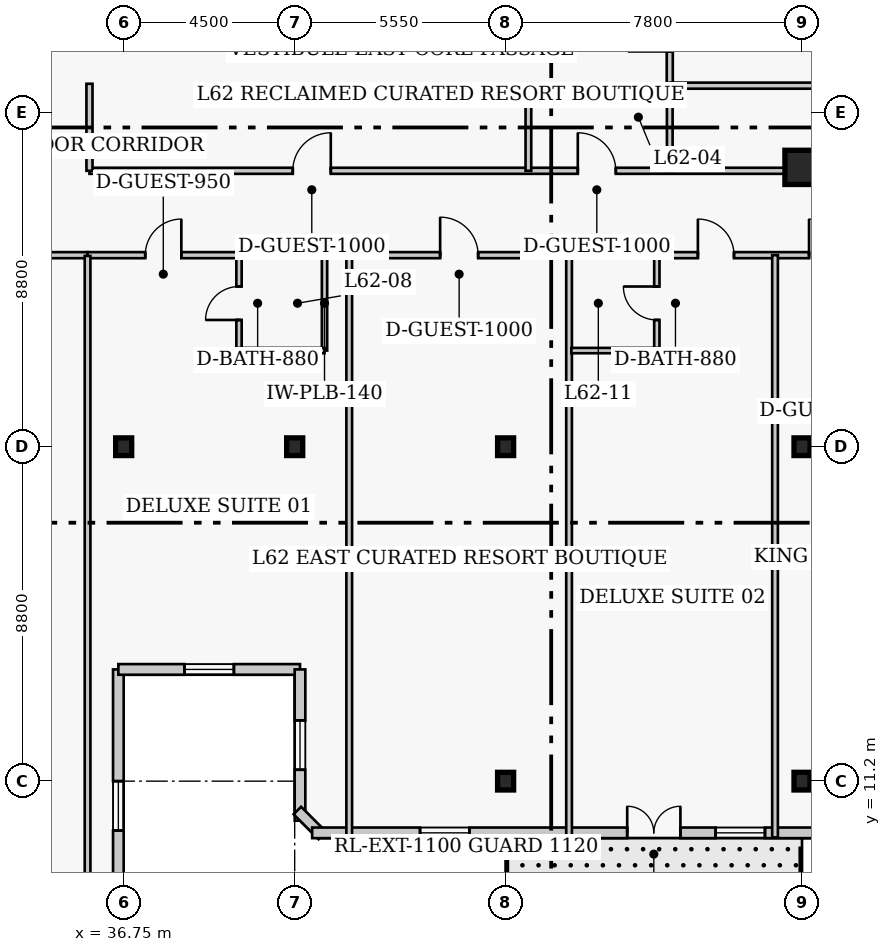
"""IFC4 building model, lengths in metres.
Left out: names, types, materials, properties, quantities, classifications, styles, units other than length and angle.
Written with IfcOpenShell. Run it as: python <this file> out.ifc"""

import sys

from ifc_helpers import new_model, si_unit, direction, frame, frame_2d, origin, origin_2d, place, context, subcontext, project, spatial, rectangle, i_section, extrude, element, fill, save


model = new_model("IFC4")
c1 = context("Model", 3, precision=1e-05, world=origin(), true_north=direction((0.0, 1.0)))
c2 = subcontext(c1, "Body", "Model", "MODEL_VIEW")
j1 = project(units=[si_unit("LENGTHUNIT", "METRE"), si_unit("PLANEANGLEUNIT", "RADIAN")], contexts=[c1])
p1 = place(None, origin())
s1 = spatial("IfcSite", under=j1, at=p1, CompositionType="ELEMENT")
p2 = place(p1, origin())
s2 = spatial("IfcBuilding", under=s1, at=p2, CompositionType="ELEMENT")
p3 = place(p2, frame((0.0, 0.0, 249.4)))
s3 = spatial("IfcBuildingStorey", under=s2, at=p3, CompositionType="ELEMENT", Elevation=249.4)
for number, where, z_axis, x_axis in (
    (1, (36.75, 20.0, 0.0), (0.0, 0.0, 1.0), (1.0, 0.0, 0.0)),
    (2, (41.25, 20.0, 0.0), (0.0, 0.0, 1.0), (1.0, 0.0, 0.0)),
    (3, (46.8, 11.2, 0.0), (0.0, 0.0, 1.0), (1.0, 0.0, 0.0)),
    (4, (46.8, 20.0, 0.0), (0.0, 0.0, 1.0), (1.0, 0.0, 0.0)),
    (5, (54.6, 11.2, 0.0), (0.0, 0.0, 1.0), (1.0, 0.0, 0.0)),
    (6, (54.6, 20.0, 0.0), (0.0, 0.0, 1.0), (1.0, 0.0, 0.0)),
):
    element("IfcColumn", number, at=place(p3, frame(where, z_axis=z_axis, x_axis=x_axis)), inside=s3, PredefinedType="COLUMN", context=c2, shape_type="SweptSolid", body=[
        extrude(i_section(OverallWidth=0.422, OverallDepth=0.465, WebThickness=0.045, FlangeThickness=0.073, FilletRadius=0.017, at=origin_2d()), origin(), (0.0, 0.0, 1.0), 4.0),
    ])
p4 = place(p3, frame((54.6, 27.35, 0.0), z_axis=(0.0, 0.0, 1.0), x_axis=(1.0, 0.0, 0.0)))
e7 = element("IfcColumn", 7, at=p4, inside=s3, PredefinedType="COLUMN", context=c2, shape_type="SweptSolid", body=[
    extrude(rectangle(XDim=0.9, YDim=0.9, at=origin_2d()), origin(), (0.0, 0.0, 1.0), 4.0),
])
p5 = place(p3, frame((36.61, 6.96, 0.0), z_axis=(0.0, 0.0, 1.0), x_axis=(0.0, 1.0, 0.0)))
e8 = element("IfcWall", 8, at=p5, inside=s3, PredefinedType="SOLIDWALL", context=c2, shape_type="SweptSolid", body=[
    extrude(rectangle(XDim=7.18, YDim=0.28, at=frame_2d((3.59, 0.0))), origin(), (0.0, 0.0, 1.0), 3.76),
])
p6 = place(p5, frame((2.94, 0.0, 0.85)))
e9 = element("IfcOpeningElement", 9, at=p6, cuts=e8, PredefinedType="OPENING", context=c2, shape_type="SweptSolid", body=[
    extrude(rectangle(XDim=1.3, YDim=1.7, at=frame_2d((0.65, 0.85))), frame((0.0, 0.15, 0.0), z_axis=(0.0, -1.0, 0.0), x_axis=(1.0, 0.0, 0.0)), (0.0, 0.0, 1.0), 0.3),
])
p7 = place(p3, frame((36.61, 14.14, 0.0), z_axis=(0.0, 0.0, 1.0), x_axis=(1.0, 0.0, 0.0)))
e10 = element("IfcWall", 10, at=p7, inside=s3, PredefinedType="SOLIDWALL", context=c2, shape_type="SweptSolid", body=[
    extrude(rectangle(XDim=4.78, YDim=0.28, at=frame_2d((2.39, 0.0))), origin(), (0.0, 0.0, 1.0), 3.76),
])
p8 = place(p7, frame((1.74, 0.0, 0.85)))
e11 = element("IfcOpeningElement", 11, at=p8, cuts=e10, PredefinedType="OPENING", context=c2, shape_type="SweptSolid", body=[
    extrude(rectangle(XDim=1.3, YDim=1.7, at=frame_2d((0.65, 0.85))), frame((0.0, 0.15, 0.0), z_axis=(0.0, -1.0, 0.0), x_axis=(1.0, 0.0, 0.0)), (0.0, 0.0, 1.0), 0.3),
])
p9 = place(p3, frame((41.39, 14.14, 0.0), z_axis=(0.0, 0.0, 1.0), x_axis=(0.0, -1.0, 0.0)))
e12 = element("IfcWall", 12, at=p9, inside=s3, PredefinedType="SOLIDWALL", context=c2, shape_type="SweptSolid", body=[
    extrude(rectangle(XDim=3.98, YDim=0.28, at=frame_2d((1.99, 0.0))), origin(), (0.0, 0.0, 1.0), 3.76),
])
p10 = place(p9, frame((1.34, 0.0, 0.85)))
e13 = element("IfcOpeningElement", 13, at=p10, cuts=e12, PredefinedType="OPENING", context=c2, shape_type="SweptSolid", body=[
    extrude(rectangle(XDim=1.3, YDim=1.7, at=frame_2d((0.65, 0.85))), frame((0.0, 0.15, 0.0), z_axis=(0.0, -1.0, 0.0), x_axis=(1.0, 0.0, 0.0)), (0.0, 0.0, 1.0), 0.3),
])
p11 = place(p3, frame((41.321, 10.427, 0.0), z_axis=(0.0, 0.0, 1.0), x_axis=(0.707106781187, -0.707106781187, 0.0)))
e14 = element("IfcWall", 14, at=p11, inside=s3, PredefinedType="SOLIDWALL", context=c2, shape_type="SweptSolid", body=[
    extrude(rectangle(XDim=0.928, YDim=0.28, at=frame_2d((0.464, 0.0))), origin(), (0.0, 0.0, 1.0), 3.76),
])
p12 = place(p3, frame((41.71, 9.84, 0.0), z_axis=(0.0, 0.0, 1.0), x_axis=(1.0, 0.0, 0.0)))
e15 = element("IfcWall", 15, at=p12, inside=s3, PredefinedType="SOLIDWALL", context=c2, shape_type="SweptSolid", body=[
    extrude(rectangle(XDim=24.83, YDim=0.28, at=frame_2d((12.415, 0.0))), origin(), (0.0, 0.0, 1.0), 3.76),
])
p13 = place(p12, frame((8.29, 0.0, 0.0)))
e16 = element("IfcOpeningElement", 16, at=p13, cuts=e15, PredefinedType="OPENING", context=c2, shape_type="SweptSolid", body=[
    extrude(rectangle(XDim=1.4, YDim=2.15, at=frame_2d((0.7, 1.075))), frame((0.0, 0.15, 0.0), z_axis=(0.0, -1.0, 0.0), x_axis=(1.0, 0.0, 0.0)), (0.0, 0.0, 1.0), 0.3),
])
p14 = place(p12, frame((2.838, 0.0, 0.85)))
e17 = element("IfcOpeningElement", 17, at=p14, cuts=e15, PredefinedType="OPENING", context=c2, shape_type="SweptSolid", body=[
    extrude(rectangle(XDim=1.3, YDim=1.7, at=frame_2d((0.65, 0.85))), frame((0.0, 0.15, 0.0), z_axis=(0.0, -1.0, 0.0), x_axis=(1.0, 0.0, 0.0)), (0.0, 0.0, 1.0), 0.3),
])
p15 = place(p12, frame((10.615, 0.0, 0.85)))
e18 = element("IfcOpeningElement", 18, at=p15, cuts=e15, PredefinedType="OPENING", context=c2, shape_type="SweptSolid", body=[
    extrude(rectangle(XDim=1.3, YDim=1.7, at=frame_2d((0.65, 0.85))), frame((0.0, 0.15, 0.0), z_axis=(0.0, -1.0, 0.0), x_axis=(1.0, 0.0, 0.0)), (0.0, 0.0, 1.0), 0.3),
])
p16 = place(p12, frame((18.892, 0.0, 0.85)))
e19 = element("IfcOpeningElement", 19, at=p16, cuts=e15, PredefinedType="OPENING", context=c2, shape_type="SweptSolid", body=[
    extrude(rectangle(XDim=1.3, YDim=1.7, at=frame_2d((0.65, 0.85))), frame((0.0, 0.15, 0.0), z_axis=(0.0, -1.0, 0.0), x_axis=(1.0, 0.0, 0.0)), (0.0, 0.0, 1.0), 0.3),
])
p17 = place(p12, frame((14.065, 0.0, 0.85)))
e20 = element("IfcOpeningElement", 20, at=p17, cuts=e15, PredefinedType="OPENING", context=c2, shape_type="SweptSolid", body=[
    extrude(rectangle(XDim=1.3, YDim=1.7, at=frame_2d((0.65, 0.85))), frame((0.0, 0.15, 0.0), z_axis=(0.0, -1.0, 0.0), x_axis=(1.0, 0.0, 0.0)), (0.0, 0.0, 1.0), 0.3),
])
p18 = place(p3, frame((51.12, 29.5, 0.0), z_axis=(0.0, 0.0, 1.0), x_axis=(0.0, 1.0, 0.0)))
e21 = element("IfcWall", 21, at=p18, inside=s3, PredefinedType="PARTITIONING", context=c2, shape_type="SweptSolid", body=[
    extrude(rectangle(XDim=3.7, YDim=0.16, at=frame_2d((1.85, 0.0))), origin(), (0.0, 0.0, 1.0), 3.76),
])
p19 = place(p18, frame((0.9, 0.0, 0.0)))
e22 = element("IfcOpeningElement", 22, at=p19, cuts=e21, PredefinedType="OPENING", context=c2, shape_type="SweptSolid", body=[
    extrude(rectangle(XDim=1.1, YDim=2.15, at=frame_2d((0.55, 1.075))), frame((0.0, 0.09, 0.0), z_axis=(0.0, -1.0, 0.0), x_axis=(1.0, 0.0, 0.0)), (0.0, 0.0, 1.0), 0.18),
])
p20 = place(p3, frame((51.12, 29.5, 0.0), z_axis=(0.0, 0.0, 1.0), x_axis=(1.0, 0.0, 0.0)))
e23 = element("IfcWall", 23, at=p20, inside=s3, PredefinedType="PARTITIONING", context=c2, shape_type="SweptSolid", body=[
    extrude(rectangle(XDim=5.63, YDim=0.16, at=frame_2d((2.815, 0.0))), origin(), (0.0, 0.0, 1.0), 3.76),
])
p21 = place(p3, frame((35.85, 27.26, 0.0), z_axis=(0.0, 0.0, 1.0), x_axis=(1.0, 0.0, 0.0)))
e24 = element("IfcWall", 24, at=p21, inside=s3, PredefinedType="PARTITIONING", context=c2, shape_type="SweptSolid", body=[
    extrude(rectangle(XDim=23.15, YDim=0.16, at=frame_2d((11.575, 0.0))), origin(), (0.0, 0.0, 1.0), 3.76),
])
p22 = place(p21, frame((5.35, 0.0, 0.0)))
e25 = element("IfcOpeningElement", 25, at=p22, cuts=e24, PredefinedType="OPENING", context=c2, shape_type="SweptSolid", body=[
    extrude(rectangle(XDim=1.0, YDim=2.15, at=frame_2d((0.5, 1.075))), frame((0.0, 0.09, 0.0), z_axis=(0.0, -1.0, 0.0), x_axis=(1.0, 0.0, 0.0)), (0.0, 0.0, 1.0), 0.18),
])
p23 = place(p21, frame((12.85, 0.0, 0.0)))
e26 = element("IfcOpeningElement", 26, at=p23, cuts=e24, PredefinedType="OPENING", context=c2, shape_type="SweptSolid", body=[
    extrude(rectangle(XDim=1.0, YDim=2.15, at=frame_2d((0.5, 1.075))), frame((0.0, 0.09, 0.0), z_axis=(0.0, -1.0, 0.0), x_axis=(1.0, 0.0, 0.0)), (0.0, 0.0, 1.0), 0.18),
])
p24 = place(p3, frame((35.85, 27.26, 0.0), z_axis=(0.0, 0.0, 1.0), x_axis=(0.0, 1.0, 0.0)))
e27 = element("IfcWall", 27, at=p24, inside=s3, PredefinedType="PARTITIONING", context=c2, shape_type="SweptSolid", body=[
    extrude(rectangle(XDim=2.29, YDim=0.16, at=frame_2d((1.145, 0.0))), origin(), (0.0, 0.0, 1.0), 3.76),
])
p25 = place(p3, frame((19.35, 25.04, 0.0), z_axis=(0.0, 0.0, 1.0), x_axis=(1.0, 0.0, 0.0)))
e28 = element("IfcWall", 28, at=p25, inside=s3, PredefinedType="PARTITIONING", context=c2, shape_type="SweptSolid", body=[
    extrude(rectangle(XDim=16.45, YDim=0.16, at=frame_2d((8.225, 0.0))), origin(), (0.0, 0.0, 1.0), 3.76),
])
p26 = place(p25, frame((7.755, 0.0, 0.0)))
e29 = element("IfcOpeningElement", 29, at=p26, cuts=e28, PredefinedType="OPENING", context=c2, shape_type="SweptSolid", body=[
    extrude(rectangle(XDim=1.0, YDim=2.15, at=frame_2d((0.5, 1.075))), frame((0.0, 0.09, 0.0), z_axis=(0.0, -1.0, 0.0), x_axis=(1.0, 0.0, 0.0)), (0.0, 0.0, 1.0), 0.18),
])
p27 = place(p3, frame((35.8, 25.04, 0.0), z_axis=(0.0, 0.0, 1.0), x_axis=(1.0, 0.0, 0.0)))
e30 = element("IfcWall", 30, at=p27, inside=s3, PredefinedType="PARTITIONING", context=c2, shape_type="SweptSolid", body=[
    extrude(rectangle(XDim=25.36, YDim=0.16, at=frame_2d((12.68, 0.0))), origin(), (0.0, 0.0, 1.0), 3.76),
])
p28 = place(p27, frame((1.518, 0.0, 0.0)))
e31 = element("IfcOpeningElement", 31, at=p28, cuts=e30, PredefinedType="OPENING", context=c2, shape_type="SweptSolid", body=[
    extrude(rectangle(XDim=0.95, YDim=2.1, at=frame_2d((0.475, 1.05))), frame((0.0, 0.09, 0.0), z_axis=(0.0, -1.0, 0.0), x_axis=(1.0, 0.0, 0.0)), (0.0, 0.0, 1.0), 0.18),
])
p29 = place(p27, frame((9.278, 0.0, 0.0)))
e32 = element("IfcOpeningElement", 32, at=p29, cuts=e30, PredefinedType="OPENING", context=c2, shape_type="SweptSolid", body=[
    extrude(rectangle(XDim=1.0, YDim=2.15, at=frame_2d((0.5, 1.075))), frame((0.0, 0.09, 0.0), z_axis=(0.0, -1.0, 0.0), x_axis=(1.0, 0.0, 0.0)), (0.0, 0.0, 1.0), 0.18),
])
p30 = place(p27, frame((16.06, 0.0, 0.0)))
e33 = element("IfcOpeningElement", 33, at=p30, cuts=e30, PredefinedType="OPENING", context=c2, shape_type="SweptSolid", body=[
    extrude(rectangle(XDim=0.95, YDim=2.1, at=frame_2d((0.475, 1.05))), frame((0.0, 0.09, 0.0), z_axis=(0.0, -1.0, 0.0), x_axis=(1.0, 0.0, 0.0)), (0.0, 0.0, 1.0), 0.18),
])
p31 = place(p27, frame((18.985, 0.0, 0.0)))
e34 = element("IfcOpeningElement", 34, at=p31, cuts=e30, PredefinedType="OPENING", context=c2, shape_type="SweptSolid", body=[
    extrude(rectangle(XDim=0.95, YDim=2.1, at=frame_2d((0.475, 1.05))), frame((0.0, 0.09, 0.0), z_axis=(0.0, -1.0, 0.0), x_axis=(1.0, 0.0, 0.0)), (0.0, 0.0, 1.0), 0.18),
])
p32 = place(p27, frame((23.815, 0.0, 0.0)))
e35 = element("IfcOpeningElement", 35, at=p32, cuts=e30, PredefinedType="OPENING", context=c2, shape_type="SweptSolid", body=[
    extrude(rectangle(XDim=0.95, YDim=2.1, at=frame_2d((0.475, 1.05))), frame((0.0, 0.09, 0.0), z_axis=(0.0, -1.0, 0.0), x_axis=(1.0, 0.0, 0.0)), (0.0, 0.0, 1.0), 0.18),
])
for number, where, z_axis, x_axis in (
    (36, (47.4, 27.26, 0.0), (0.0, 0.0, 1.0), (0.0, 1.0, 0.0)),
    (37, (51.12, 27.26, 0.0), (0.0, 0.0, 1.0), (0.0, 1.0, 0.0)),
):
    element("IfcWall", number, at=place(p3, frame(where, z_axis=z_axis, x_axis=x_axis)), inside=s3, PredefinedType="PARTITIONING", context=c2, shape_type="SweptSolid", body=[
        extrude(rectangle(XDim=2.29, YDim=0.15, at=frame_2d((1.145, 0.0))), origin(), (0.0, 0.0, 1.0), 3.76),
    ])
p33 = place(p3, frame((35.8, 6.52, 0.0), z_axis=(0.0, 0.0, 1.0), x_axis=(0.0, 1.0, 0.0)))
e38 = element("IfcWall", 38, at=p33, inside=s3, PredefinedType="PARTITIONING", context=c2, shape_type="SweptSolid", body=[
    extrude(rectangle(XDim=18.5, YDim=0.15, at=frame_2d((9.25, 0.0))), origin(), (0.0, 0.0, 1.0), 3.76),
])
p34 = place(p3, frame((39.785, 22.53, 0.0), z_axis=(0.0, 0.0, 1.0), x_axis=(0.0, 1.0, 0.0)))
e39 = element("IfcWall", 39, at=p34, inside=s3, PredefinedType="PLUMBINGWALL", context=c2, shape_type="SweptSolid", body=[
    extrude(rectangle(XDim=2.49, YDim=0.14, at=frame_2d((1.245, 0.0))), origin(), (0.0, 0.0, 1.0), 3.76),
])
p35 = place(p34, frame((0.805, 0.0, 0.0)))
e40 = element("IfcOpeningElement", 40, at=p35, cuts=e39, PredefinedType="OPENING", context=c2, shape_type="SweptSolid", body=[
    extrude(rectangle(XDim=0.88, YDim=2.05, at=frame_2d((0.44, 1.025))), frame((0.0, 0.08, 0.0), z_axis=(0.0, -1.0, 0.0), x_axis=(1.0, 0.0, 0.0)), (0.0, 0.0, 1.0), 0.16),
])
p36 = place(p3, frame((42.035, 22.53, 0.0), z_axis=(0.0, 0.0, 1.0), x_axis=(0.0, 1.0, 0.0)))
e41 = element("IfcWall", 41, at=p36, inside=s3, PredefinedType="PLUMBINGWALL", context=c2, shape_type="SweptSolid", body=[
    extrude(rectangle(XDim=2.49, YDim=0.14, at=frame_2d((1.245, 0.0))), origin(), (0.0, 0.0, 1.0), 3.76),
])
p37 = place(p3, frame((39.785, 22.53, 0.0), z_axis=(0.0, 0.0, 1.0), x_axis=(1.0, 0.0, 0.0)))
e42 = element("IfcWall", 42, at=p37, inside=s3, PredefinedType="PLUMBINGWALL", context=c2, shape_type="SweptSolid", body=[
    extrude(rectangle(XDim=2.25, YDim=0.14, at=frame_2d((1.125, 0.0))), origin(), (0.0, 0.0, 1.0), 3.76),
])
for number, where, z_axis, x_axis in (
    (43, (42.685, 9.72, 0.0), (0.0, 0.0, 1.0), (0.0, 1.0, 0.0)),
    (44, (48.47, 9.72, 0.0), (0.0, 0.0, 1.0), (0.0, 1.0, 0.0)),
):
    element("IfcWall", number, at=place(p3, frame(where, z_axis=z_axis, x_axis=x_axis)), inside=s3, PredefinedType="PARTITIONING", context=c2, shape_type="SweptSolid", body=[
        extrude(rectangle(XDim=15.32, YDim=0.15, at=frame_2d((7.66, 0.0))), origin(), (0.0, 0.0, 1.0), 3.76),
    ])
p38 = place(p3, frame((50.78, 22.53, 0.0), z_axis=(0.0, 0.0, 1.0), x_axis=(0.0, 1.0, 0.0)))
e45 = element("IfcWall", 45, at=p38, inside=s3, PredefinedType="PLUMBINGWALL", context=c2, shape_type="SweptSolid", body=[
    extrude(rectangle(XDim=2.49, YDim=0.14, at=frame_2d((1.245, 0.0))), origin(), (0.0, 0.0, 1.0), 3.76),
])
p39 = place(p38, frame((0.805, 0.0, 0.0)))
e46 = element("IfcOpeningElement", 46, at=p39, cuts=e45, PredefinedType="OPENING", context=c2, shape_type="SweptSolid", body=[
    extrude(rectangle(XDim=0.88, YDim=2.05, at=frame_2d((0.44, 1.025))), frame((0.0, 0.08, 0.0), z_axis=(0.0, -1.0, 0.0), x_axis=(1.0, 0.0, 0.0)), (0.0, 0.0, 1.0), 0.16),
])
p40 = place(p3, frame((48.53, 22.53, 0.0), z_axis=(0.0, 0.0, 1.0), x_axis=(1.0, 0.0, 0.0)))
e47 = element("IfcWall", 47, at=p40, inside=s3, PredefinedType="PLUMBINGWALL", context=c2, shape_type="SweptSolid", body=[
    extrude(rectangle(XDim=2.25, YDim=0.14, at=frame_2d((1.125, 0.0))), origin(), (0.0, 0.0, 1.0), 3.76),
])
p41 = place(p3, frame((53.89, 9.72, 0.0), z_axis=(0.0, 0.0, 1.0), x_axis=(0.0, 1.0, 0.0)))
e48 = element("IfcWall", 48, at=p41, inside=s3, PredefinedType="PARTITIONING", context=c2, shape_type="SweptSolid", body=[
    extrude(rectangle(XDim=15.32, YDim=0.15, at=frame_2d((7.66, 0.0))), origin(), (0.0, 0.0, 1.0), 3.76),
])
p42 = place(p6, origin())
e49 = element("IfcWindow", 49, at=p42, inside=s3, PartitioningType="SINGLE_PANEL", PredefinedType="WINDOW", context=c2, shape_type="SweptSolid", body=[
    extrude(rectangle(XDim=1.3, YDim=1.7, at=frame_2d((0.65, 0.85))), frame((0.0, 0.03, 0.0), z_axis=(0.0, -1.0, 0.0), x_axis=(1.0, 0.0, 0.0)), (0.0, 0.0, 1.0), 0.06),
])
fill(e9, e49)
p43 = place(p8, origin())
e50 = element("IfcWindow", 50, at=p43, inside=s3, PartitioningType="SINGLE_PANEL", PredefinedType="WINDOW", context=c2, shape_type="SweptSolid", body=[
    extrude(rectangle(XDim=1.3, YDim=1.7, at=frame_2d((0.65, 0.85))), frame((0.0, 0.03, 0.0), z_axis=(0.0, -1.0, 0.0), x_axis=(1.0, 0.0, 0.0)), (0.0, 0.0, 1.0), 0.06),
])
fill(e11, e50)
p44 = place(p10, origin())
e51 = element("IfcWindow", 51, at=p44, inside=s3, PartitioningType="SINGLE_PANEL", PredefinedType="WINDOW", context=c2, shape_type="SweptSolid", body=[
    extrude(rectangle(XDim=1.3, YDim=1.7, at=frame_2d((0.65, 0.85))), frame((0.0, 0.03, 0.0), z_axis=(0.0, -1.0, 0.0), x_axis=(1.0, 0.0, 0.0)), (0.0, 0.0, 1.0), 0.06),
])
fill(e13, e51)
p45 = place(p13, origin())
e52 = element("IfcDoor", 52, at=p45, inside=s3, OperationType="DOUBLE_DOOR_SINGLE_SWING", PredefinedType="DOOR", context=c2, shape_type="SweptSolid", body=[
    extrude(rectangle(XDim=1.4, YDim=2.15, at=frame_2d((0.7, 1.075))), frame((0.0, 0.025, 0.0), z_axis=(0.0, -1.0, 0.0), x_axis=(1.0, 0.0, 0.0)), (0.0, 0.0, 1.0), 0.05),
])
fill(e16, e52)
p46 = place(p14, origin())
e53 = element("IfcWindow", 53, at=p46, inside=s3, PartitioningType="SINGLE_PANEL", PredefinedType="WINDOW", context=c2, shape_type="SweptSolid", body=[
    extrude(rectangle(XDim=1.3, YDim=1.7, at=frame_2d((0.65, 0.85))), frame((0.0, 0.03, 0.0), z_axis=(0.0, -1.0, 0.0), x_axis=(1.0, 0.0, 0.0)), (0.0, 0.0, 1.0), 0.06),
])
fill(e17, e53)
p47 = place(p15, origin())
e54 = element("IfcWindow", 54, at=p47, inside=s3, PartitioningType="SINGLE_PANEL", PredefinedType="WINDOW", context=c2, shape_type="SweptSolid", body=[
    extrude(rectangle(XDim=1.3, YDim=1.7, at=frame_2d((0.65, 0.85))), frame((0.0, 0.03, 0.0), z_axis=(0.0, -1.0, 0.0), x_axis=(1.0, 0.0, 0.0)), (0.0, 0.0, 1.0), 0.06),
])
fill(e18, e54)
p48 = place(p22, origin())
e55 = element("IfcDoor", 55, at=p48, inside=s3, OperationType="SINGLE_SWING_RIGHT", PredefinedType="DOOR", context=c2, shape_type="SweptSolid", body=[
    extrude(rectangle(XDim=1.0, YDim=2.15, at=frame_2d((0.5, 1.075))), frame((0.0, 0.025, 0.0), z_axis=(0.0, -1.0, 0.0), x_axis=(1.0, 0.0, 0.0)), (0.0, 0.0, 1.0), 0.05),
])
fill(e25, e55)
p49 = place(p23, origin())
e56 = element("IfcDoor", 56, at=p49, inside=s3, OperationType="SINGLE_SWING_LEFT", PredefinedType="DOOR", context=c2, shape_type="SweptSolid", body=[
    extrude(rectangle(XDim=1.0, YDim=2.15, at=frame_2d((0.5, 1.075))), frame((0.0, 0.025, 0.0), z_axis=(0.0, -1.0, 0.0), x_axis=(1.0, 0.0, 0.0)), (0.0, 0.0, 1.0), 0.05),
])
fill(e26, e56)
p50 = place(p35, origin())
e57 = element("IfcDoor", 57, at=p50, inside=s3, OperationType="SINGLE_SWING_LEFT", PredefinedType="DOOR", context=c2, shape_type="SweptSolid", body=[
    extrude(rectangle(XDim=0.88, YDim=2.05, at=frame_2d((0.44, 1.025))), frame((0.0, 0.025, 0.0), z_axis=(0.0, -1.0, 0.0), x_axis=(1.0, 0.0, 0.0)), (0.0, 0.0, 1.0), 0.05),
])
fill(e40, e57)
p51 = place(p28, origin())
e58 = element("IfcDoor", 58, at=p51, inside=s3, OperationType="SINGLE_SWING_RIGHT", PredefinedType="DOOR", context=c2, shape_type="SweptSolid", body=[
    extrude(rectangle(XDim=0.95, YDim=2.1, at=frame_2d((0.475, 1.05))), frame((0.0, 0.025, 0.0), z_axis=(0.0, -1.0, 0.0), x_axis=(1.0, 0.0, 0.0)), (0.0, 0.0, 1.0), 0.05),
])
fill(e31, e58)
p52 = place(p29, origin())
e59 = element("IfcDoor", 59, at=p52, inside=s3, OperationType="SINGLE_SWING_LEFT", PredefinedType="DOOR", context=c2, shape_type="SweptSolid", body=[
    extrude(rectangle(XDim=1.0, YDim=2.15, at=frame_2d((0.5, 1.075))), frame((0.0, 0.025, 0.0), z_axis=(0.0, -1.0, 0.0), x_axis=(1.0, 0.0, 0.0)), (0.0, 0.0, 1.0), 0.05),
])
fill(e32, e59)
p53 = place(p39, origin())
e60 = element("IfcDoor", 60, at=p53, inside=s3, OperationType="SINGLE_SWING_RIGHT", PredefinedType="DOOR", context=c2, shape_type="SweptSolid", body=[
    extrude(rectangle(XDim=0.88, YDim=2.05, at=frame_2d((0.44, 1.025))), frame((0.0, 0.025, 0.0), z_axis=(0.0, -1.0, 0.0), x_axis=(1.0, 0.0, 0.0)), (0.0, 0.0, 1.0), 0.05),
])
fill(e46, e60)
p54 = place(p30, origin())
e61 = element("IfcDoor", 61, at=p54, inside=s3, OperationType="SINGLE_SWING_LEFT", PredefinedType="DOOR", context=c2, shape_type="SweptSolid", body=[
    extrude(rectangle(XDim=0.95, YDim=2.1, at=frame_2d((0.475, 1.05))), frame((0.0, 0.025, 0.0), z_axis=(0.0, -1.0, 0.0), x_axis=(1.0, 0.0, 0.0)), (0.0, 0.0, 1.0), 0.05),
])
fill(e33, e61)
p55 = place(p31, origin())
e62 = element("IfcDoor", 62, at=p55, inside=s3, OperationType="SINGLE_SWING_LEFT", PredefinedType="DOOR", context=c2, shape_type="SweptSolid", body=[
    extrude(rectangle(XDim=0.95, YDim=2.1, at=frame_2d((0.475, 1.05))), frame((0.0, 0.025, 0.0), z_axis=(0.0, -1.0, 0.0), x_axis=(1.0, 0.0, 0.0)), (0.0, 0.0, 1.0), 0.05),
])
fill(e34, e62)
save(model, sys.argv[1])
